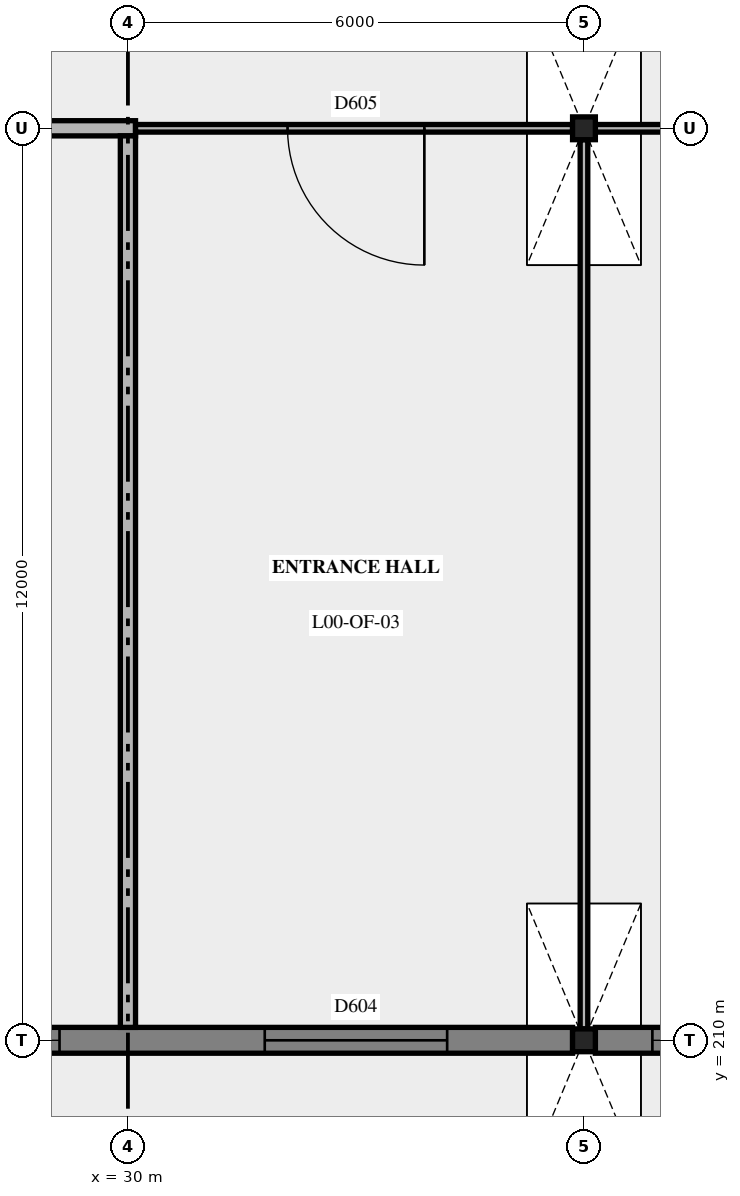
"""IFC4 building model, lengths in metres.
Left out: names, types, materials, properties, quantities, classifications, styles, units other than length and angle.
Written with IfcOpenShell. Run it as: python <this file> out.ifc"""

import sys

from ifc_helpers import new_model, si_unit, direction, frame, frame_2d, origin, origin_2d, place, context, subcontext, project, spatial, rectangle, i_section, extrude, element, fill, save


model = new_model("IFC4")
c1 = context("Model", 3, precision=1e-05, world=origin(), true_north=direction((0.0, 1.0)))
c2 = subcontext(c1, "Body", "Model", "MODEL_VIEW")
j1 = project(units=[si_unit("LENGTHUNIT", "METRE"), si_unit("PLANEANGLEUNIT", "RADIAN")], contexts=[c1])
p1 = place(None, origin())
s1 = spatial("IfcSite", under=j1, at=p1, CompositionType="ELEMENT")
p2 = place(p1, origin())
s2 = spatial("IfcBuilding", under=s1, at=p2, CompositionType="ELEMENT")
p3 = place(p2, origin())
s3 = spatial("IfcBuildingStorey", under=s2, at=p3, CompositionType="ELEMENT", Elevation=0.0)
for number, where, z_axis, x_axis in (
    (1, (36.0, 210.0, 0.0), (0.0, 0.0, 1.0), (1.0, 0.0, 0.0)),
    (2, (36.0, 222.0, 0.0), (0.0, 0.0, 1.0), (1.0, 0.0, 0.0)),
):
    element("IfcColumn", number, at=place(p3, frame(where, z_axis=z_axis, x_axis=x_axis)), inside=s3, PredefinedType="COLUMN", context=c2, shape_type="SweptSolid", body=[
        extrude(i_section(OverallWidth=0.3, OverallDepth=0.3, WebThickness=0.011, FlangeThickness=0.019, at=origin_2d()), origin(), (0.0, 0.0, 1.0), 5.4),
    ])
p4 = place(p3, frame((24.15, 210.0, 0.0), z_axis=(0.0, 0.0, 1.0), x_axis=(1.0, 0.0, 0.0)))
e3 = element("IfcWall", 3, at=p4, inside=s3, PredefinedType="SOLIDWALL", context=c2, shape_type="SweptSolid", body=[
    extrude(rectangle(XDim=11.7, YDim=0.34, at=frame_2d((5.85, 0.0))), origin(), (0.0, 0.0, 1.0), 4.65),
])
p5 = place(p4, frame((0.75, 0.0, 0.9)))
e4 = element("IfcOpeningElement", 4, at=p5, cuts=e3, PredefinedType="OPENING", context=c2, shape_type="SweptSolid", body=[
    extrude(rectangle(XDim=1.2, YDim=3.3, at=frame_2d((0.6, 1.65))), frame((0.0, 0.18, 0.0), z_axis=(0.0, -1.0, 0.0), x_axis=(1.0, 0.0, 0.0)), (0.0, 0.0, 1.0), 0.36),
])
p6 = place(p4, frame((3.75, 0.0, 0.9)))
e5 = element("IfcOpeningElement", 5, at=p6, cuts=e3, PredefinedType="OPENING", context=c2, shape_type="SweptSolid", body=[
    extrude(rectangle(XDim=1.2, YDim=3.3, at=frame_2d((0.6, 1.65))), frame((0.0, 0.18, 0.0), z_axis=(0.0, -1.0, 0.0), x_axis=(1.0, 0.0, 0.0)), (0.0, 0.0, 1.0), 0.36),
])
p7 = place(p4, frame((7.65, 0.0, 0.0)))
e6 = element("IfcOpeningElement", 6, at=p7, cuts=e3, PredefinedType="OPENING", context=c2, shape_type="SweptSolid", body=[
    extrude(rectangle(XDim=2.4, YDim=2.4, at=frame_2d((1.2, 1.2))), frame((0.0, 0.18, 0.0), z_axis=(0.0, -1.0, 0.0), x_axis=(1.0, 0.0, 0.0)), (0.0, 0.0, 1.0), 0.36),
])
p8 = place(p3, frame((36.15, 210.0, 0.0), z_axis=(0.0, 0.0, 1.0), x_axis=(1.0, 0.0, 0.0)))
e7 = element("IfcWall", 7, at=p8, inside=s3, PredefinedType="SOLIDWALL", context=c2, shape_type="SweptSolid", body=[
    extrude(rectangle(XDim=11.7, YDim=0.34, at=frame_2d((5.85, 0.0))), origin(), (0.0, 0.0, 1.0), 4.65),
])
p9 = place(p8, frame((0.75, 0.0, 0.9)))
e8 = element("IfcOpeningElement", 8, at=p9, cuts=e7, PredefinedType="OPENING", context=c2, shape_type="SweptSolid", body=[
    extrude(rectangle(XDim=1.2, YDim=3.3, at=frame_2d((0.6, 1.65))), frame((0.0, 0.18, 0.0), z_axis=(0.0, -1.0, 0.0), x_axis=(1.0, 0.0, 0.0)), (0.0, 0.0, 1.0), 0.36),
])
p10 = place(p8, frame((3.75, 0.0, 0.9)))
e9 = element("IfcOpeningElement", 9, at=p10, cuts=e7, PredefinedType="OPENING", context=c2, shape_type="SweptSolid", body=[
    extrude(rectangle(XDim=1.2, YDim=3.3, at=frame_2d((0.6, 1.65))), frame((0.0, 0.18, 0.0), z_axis=(0.0, -1.0, 0.0), x_axis=(1.0, 0.0, 0.0)), (0.0, 0.0, 1.0), 0.36),
])
p11 = place(p8, frame((6.75, 0.0, 0.9)))
e10 = element("IfcOpeningElement", 10, at=p11, cuts=e7, PredefinedType="OPENING", context=c2, shape_type="SweptSolid", body=[
    extrude(rectangle(XDim=1.2, YDim=3.3, at=frame_2d((0.6, 1.65))), frame((0.0, 0.18, 0.0), z_axis=(0.0, -1.0, 0.0), x_axis=(1.0, 0.0, 0.0)), (0.0, 0.0, 1.0), 0.36),
])
p12 = place(p8, frame((9.75, 0.0, 0.9)))
e11 = element("IfcOpeningElement", 11, at=p12, cuts=e7, PredefinedType="OPENING", context=c2, shape_type="SweptSolid", body=[
    extrude(rectangle(XDim=1.2, YDim=3.3, at=frame_2d((0.6, 1.65))), frame((0.0, 0.18, 0.0), z_axis=(0.0, -1.0, 0.0), x_axis=(1.0, 0.0, 0.0)), (0.0, 0.0, 1.0), 0.36),
])
p13 = place(p3, frame((24.15, 222.0, 0.0), z_axis=(0.0, 0.0, 1.0), x_axis=(1.0, 0.0, 0.0)))
e12 = element("IfcWall", 12, at=p13, inside=s3, PredefinedType="PARTITIONING", context=c2, shape_type="SweptSolid", body=[
    extrude(rectangle(XDim=5.95, YDim=0.2, at=frame_2d((2.975, 0.0))), origin(), (0.0, 0.0, 1.0), 4.65),
])
p14 = place(p3, frame((30.1, 222.0, 0.0), z_axis=(0.0, 0.0, 1.0), x_axis=(1.0, 0.0, 0.0)))
e13 = element("IfcWall", 13, at=p14, inside=s3, PredefinedType="PARTITIONING", context=c2, shape_type="SweptSolid", body=[
    extrude(rectangle(XDim=5.75, YDim=0.1, at=frame_2d((2.875, 0.0))), origin(), (0.0, 0.0, 1.0), 4.65),
])
p15 = place(p14, frame((2.0, 0.0, 0.0)))
e14 = element("IfcOpeningElement", 14, at=p15, cuts=e13, PredefinedType="OPENING", context=c2, shape_type="SweptSolid", body=[
    extrude(rectangle(XDim=1.8, YDim=2.1, at=frame_2d((0.9, 1.05))), frame((0.0, 0.06, 0.0), z_axis=(0.0, -1.0, 0.0), x_axis=(1.0, 0.0, 0.0)), (0.0, 0.0, 1.0), 0.12),
])
p16 = place(p3, frame((36.15, 222.0, 0.0), z_axis=(0.0, 0.0, 1.0), x_axis=(1.0, 0.0, 0.0)))
e15 = element("IfcWall", 15, at=p16, inside=s3, PredefinedType="PARTITIONING", context=c2, shape_type="SweptSolid", body=[
    extrude(rectangle(XDim=11.7, YDim=0.1, at=frame_2d((5.85, 0.0))), origin(), (0.0, 0.0, 1.0), 4.65),
])
p17 = place(p3, frame((30.0, 210.17, 0.0), z_axis=(0.0, 0.0, 1.0), x_axis=(0.0, 1.0, 0.0)))
e16 = element("IfcWall", 16, at=p17, inside=s3, PredefinedType="PARTITIONING", context=c2, shape_type="SweptSolid", body=[
    extrude(rectangle(XDim=11.73, YDim=0.2, at=frame_2d((5.865, 0.0))), origin(), (0.0, 0.0, 1.0), 4.79),
])
p18 = place(p3, frame((36.0, 210.15, 0.0), z_axis=(0.0, 0.0, 1.0), x_axis=(0.0, 1.0, 0.0)))
e17 = element("IfcWall", 17, at=p18, inside=s3, PredefinedType="PARTITIONING", context=c2, shape_type="SweptSolid", body=[
    extrude(rectangle(XDim=11.7, YDim=0.1, at=frame_2d((5.85, 0.0))), origin(), (0.0, 0.0, 1.0), 4.7),
])
p19 = place(p6, origin())
e18 = element("IfcWindow", 18, at=p19, inside=s3, PartitioningType="SINGLE_PANEL", PredefinedType="WINDOW", context=c2, shape_type="SweptSolid", body=[
    extrude(rectangle(XDim=1.2, YDim=3.3, at=frame_2d((0.6, 1.65))), frame((0.0, 0.03, 0.0), z_axis=(0.0, -1.0, 0.0), x_axis=(1.0, 0.0, 0.0)), (0.0, 0.0, 1.0), 0.06),
])
fill(e5, e18)
p20 = place(p9, origin())
e19 = element("IfcWindow", 19, at=p20, inside=s3, PartitioningType="SINGLE_PANEL", PredefinedType="WINDOW", context=c2, shape_type="SweptSolid", body=[
    extrude(rectangle(XDim=1.2, YDim=3.3, at=frame_2d((0.6, 1.65))), frame((0.0, 0.03, 0.0), z_axis=(0.0, -1.0, 0.0), x_axis=(1.0, 0.0, 0.0)), (0.0, 0.0, 1.0), 0.06),
])
fill(e8, e19)
p21 = place(p7, origin())
e20 = element("IfcDoor", 20, at=p21, inside=s3, OperationType="SLIDING_TO_LEFT", PredefinedType="DOOR", context=c2, shape_type="SweptSolid", body=[
    extrude(rectangle(XDim=2.4, YDim=2.4, at=frame_2d((1.2, 1.2))), frame((0.0, 0.025, 0.0), z_axis=(0.0, -1.0, 0.0), x_axis=(1.0, 0.0, 0.0)), (0.0, 0.0, 1.0), 0.05),
])
fill(e6, e20)
p22 = place(p15, origin())
e21 = element("IfcDoor", 21, at=p22, inside=s3, OperationType="DOUBLE_DOOR_SINGLE_SWING", PredefinedType="DOOR", context=c2, shape_type="SweptSolid", body=[
    extrude(rectangle(XDim=1.8, YDim=2.1, at=frame_2d((0.9, 1.05))), frame((0.0, 0.025, 0.0), z_axis=(0.0, -1.0, 0.0), x_axis=(1.0, 0.0, 0.0)), (0.0, 0.0, 1.0), 0.05),
])
fill(e14, e21)
save(model, sys.argv[1])
